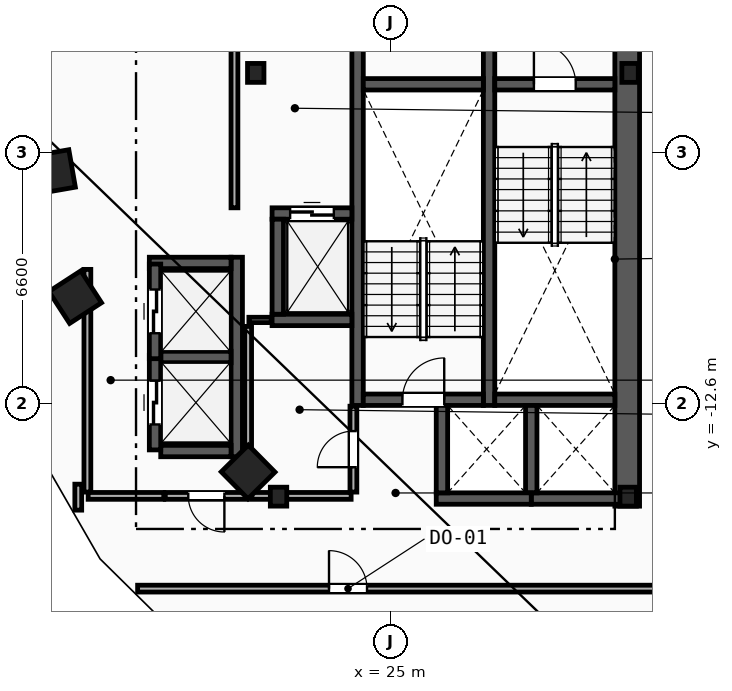
"""IFC4 building model, lengths in metres.
Left out: names, types, materials, properties, quantities, classifications, styles, units other than length and angle.
Written with IfcOpenShell. Run it as: python <this file> out.ifc"""

import sys

from ifc_helpers import new_model, si_unit, direction, frame, frame_2d, origin, origin_2d, place, context, subcontext, project, spatial, rectangle, i_section, extrude, element, fill, save


model = new_model("IFC4")
c1 = context("Model", 3, precision=1e-05, world=origin(), true_north=direction((0.0, 1.0)))
c2 = subcontext(c1, "Body", "Model", "MODEL_VIEW")
j1 = project(units=[si_unit("LENGTHUNIT", "METRE"), si_unit("PLANEANGLEUNIT", "RADIAN")], contexts=[c1])
p1 = place(None, origin())
s1 = spatial("IfcSite", under=j1, at=p1, CompositionType="ELEMENT")
p2 = place(p1, origin())
s2 = spatial("IfcBuilding", under=s1, at=p2, CompositionType="ELEMENT")
p3 = place(p2, frame((0.0, 0.0, 136.8)))
s3 = spatial("IfcBuildingStorey", under=s2, at=p3, CompositionType="ELEMENT", Elevation=136.8)
for number, where, z_axis, x_axis in (
    (1, (31.3, -3.9, 0.0), (0.0, 0.0, 1.0), (1.0, 0.0, 0.0)),
    (2, (21.45, -3.9, 0.0), (0.0, 0.0, 1.0), (1.0, 0.0, 0.0)),
    (3, (22.05, -15.05, 0.0), (0.0, 0.0, 1.0), (1.0, 0.0, 0.0)),
    (4, (31.25, -15.05, 0.0), (0.0, 0.0, 1.0), (1.0, 0.0, 0.0)),
):
    element("IfcColumn", number, at=place(p3, frame(where, z_axis=z_axis, x_axis=x_axis)), inside=s3, PredefinedType="COLUMN", context=c2, shape_type="SweptSolid", body=[
        extrude(i_section(OverallWidth=0.432, OverallDepth=0.498, WebThickness=0.056, FlangeThickness=0.089, FilletRadius=0.018, at=origin_2d()), origin(), (0.0, 0.0, 1.0), 3.6),
    ])
for number, where, z_axis, x_axis in (
    (5, (15.55, -3.2, 0.0), (0.0, 0.0, 1.0), (-0.315, -0.949, 0.0)),
    (6, (16.125, -6.5, 0.0), (0.0, 0.0, 1.0), (0.172, -0.985, 0.0)),
    (7, (16.7, -9.8, 0.0), (0.0, 0.0, 1.0), (0.544, -0.839, 0.0)),
    (8, (21.25, -14.4, 0.0), (0.0, 0.0, 1.0), (0.703, -0.711, 0.0)),
):
    element("IfcColumn", number, at=place(p3, frame(where, z_axis=z_axis, x_axis=x_axis)), inside=s3, PredefinedType="COLUMN", context=c2, shape_type="SweptSolid", body=[
        extrude(rectangle(XDim=1.0, YDim=1.0, at=origin_2d()), origin(), (0.0, 0.0, 1.0), 3.6),
    ])
p4 = place(p3, frame((31.225, -15.3, 0.0), z_axis=(0.0, 0.0, 1.0), x_axis=(0.0, 1.0, 0.0)))
e9 = element("IfcWall", 9, at=p4, inside=s3, PredefinedType="SHEAR", context=c2, shape_type="SweptSolid", body=[
    extrude(rectangle(XDim=13.33, YDim=0.65, at=frame_2d((6.665, 0.0))), origin(), (0.0, 0.0, 1.0), 3.36),
])
for number, where, z_axis, x_axis in (
    (10, (27.59, -12.65, 0.0), (0.0, 0.0, 1.0), (0.0, 1.0, 0.0)),
    (11, (24.13, -12.65, 0.0), (0.0, 0.0, 1.0), (0.0, 1.0, 0.0)),
):
    element("IfcWall", number, at=place(p3, frame(where, z_axis=z_axis, x_axis=x_axis)), inside=s3, PredefinedType="SHEAR", context=c2, shape_type="SweptSolid", body=[
        extrude(rectangle(XDim=10.68, YDim=0.3, at=frame_2d((5.34, 0.0))), origin(), (0.0, 0.0, 1.0), 3.36),
    ])
p5 = place(p3, frame((27.74, -4.2, 0.0), z_axis=(0.0, 0.0, 1.0), x_axis=(1.0, 0.0, 0.0)))
e12 = element("IfcWall", 12, at=p5, inside=s3, PredefinedType="SHEAR", context=c2, shape_type="SweptSolid", body=[
    extrude(rectangle(XDim=3.16, YDim=0.3, at=frame_2d((1.58, 0.0))), origin(), (0.0, 0.0, 1.0), 3.36),
])
p6 = place(p5, frame((1.03, 0.0, 0.0)))
e13 = element("IfcOpeningElement", 13, at=p6, cuts=e12, PredefinedType="OPENING", context=c2, shape_type="SweptSolid", body=[
    extrude(rectangle(XDim=1.1, YDim=2.15, at=frame_2d((0.55, 1.075))), frame((0.0, 0.16, 0.0), z_axis=(0.0, -1.0, 0.0), x_axis=(1.0, 0.0, 0.0)), (0.0, 0.0, 1.0), 0.32),
])
p7 = place(p3, frame((27.74, -12.5, 0.0), z_axis=(0.0, 0.0, 1.0), x_axis=(1.0, 0.0, 0.0)))
e14 = element("IfcWall", 14, at=p7, inside=s3, PredefinedType="SHEAR", context=c2, shape_type="SweptSolid", body=[
    extrude(rectangle(XDim=3.16, YDim=0.3, at=frame_2d((1.58, 0.0))), origin(), (0.0, 0.0, 1.0), 3.36),
])
p8 = place(p3, frame((24.28, -12.5, 0.0), z_axis=(0.0, 0.0, 1.0), x_axis=(1.0, 0.0, 0.0)))
e15 = element("IfcWall", 15, at=p8, inside=s3, PredefinedType="SHEAR", context=c2, shape_type="SweptSolid", body=[
    extrude(rectangle(XDim=3.16, YDim=0.3, at=frame_2d((1.58, 0.0))), origin(), (0.0, 0.0, 1.0), 3.36),
])
p9 = place(p8, frame((1.03, 0.0, 0.0)))
e16 = element("IfcOpeningElement", 16, at=p9, cuts=e15, PredefinedType="OPENING", context=c2, shape_type="SweptSolid", body=[
    extrude(rectangle(XDim=1.1, YDim=2.15, at=frame_2d((0.55, 1.075))), frame((0.0, 0.16, 0.0), z_axis=(0.0, -1.0, 0.0), x_axis=(1.0, 0.0, 0.0)), (0.0, 0.0, 1.0), 0.32),
])
p10 = place(p3, frame((24.28, -4.2, 0.0), z_axis=(0.0, 0.0, 1.0), x_axis=(1.0, 0.0, 0.0)))
e17 = element("IfcWall", 17, at=p10, inside=s3, PredefinedType="SHEAR", context=c2, shape_type="SweptSolid", body=[
    extrude(rectangle(XDim=3.16, YDim=0.3, at=frame_2d((1.58, 0.0))), origin(), (0.0, 0.0, 1.0), 3.36),
])
p11 = place(p3, frame((20.89, -7.45, 0.0), z_axis=(0.0, 0.0, 1.0), x_axis=(0.0, 1.0, 0.0)))
e18 = element("IfcWall", 18, at=p11, inside=s3, PredefinedType="PARTITIONING", context=c2, shape_type="SweptSolid", body=[
    extrude(rectangle(XDim=5.3, YDim=0.18, at=frame_2d((2.65, 0.0))), origin(), (0.0, 0.0, 1.0), 3.36),
])
p12 = place(p3, frame((21.88, -7.6, 0.0), z_axis=(0.0, 0.0, 1.0), x_axis=(1.0, 0.0, 0.0)))
e19 = element("IfcWall", 19, at=p12, inside=s3, PredefinedType="SHEAR", context=c2, shape_type="SweptSolid", body=[
    extrude(rectangle(XDim=2.1, YDim=0.3, at=frame_2d((1.05, 0.0))), origin(), (0.0, 0.0, 1.0), 3.36),
])
p13 = place(p12, frame((0.475, 0.0, 0.0)))
e20 = element("IfcOpeningElement", 20, at=p13, cuts=e19, PredefinedType="OPENING", context=c2, shape_type="SweptSolid", body=[
    extrude(rectangle(XDim=1.15, YDim=2.2, at=frame_2d((0.575, 1.1))), frame((0.0, 0.16, 0.0), z_axis=(0.0, -1.0, 0.0), x_axis=(1.0, 0.0, 0.0)), (0.0, 0.0, 1.0), 0.32),
])
p14 = place(p3, frame((21.88, -10.4, 0.0), z_axis=(0.0, 0.0, 1.0), x_axis=(1.0, 0.0, 0.0)))
e21 = element("IfcWall", 21, at=p14, inside=s3, PredefinedType="SHEAR", context=c2, shape_type="SweptSolid", body=[
    extrude(rectangle(XDim=2.1, YDim=0.3, at=frame_2d((1.05, 0.0))), origin(), (0.0, 0.0, 1.0), 3.36),
])
for number, where, z_axis, x_axis in (
    (22, (22.03, -10.25, 0.0), (0.0, 0.0, 1.0), (0.0, 1.0, 0.0)),
    (23, (28.7, -15.1, 0.0), (0.0, 0.0, 1.0), (1.0, 0.0, 0.0)),
):
    element("IfcWall", number, at=place(p3, frame(where, z_axis=z_axis, x_axis=x_axis)), inside=s3, PredefinedType="SHEAR", context=c2, shape_type="SweptSolid", body=[
        extrude(rectangle(XDim=2.5, YDim=0.3, at=frame_2d((1.25, 0.0))), origin(), (0.0, 0.0, 1.0), 3.36),
    ])
p15 = place(p3, frame((28.7, -14.95, 0.0), z_axis=(0.0, 0.0, 1.0), x_axis=(0.0, 1.0, 0.0)))
e24 = element("IfcWall", 24, at=p15, inside=s3, PredefinedType="SHEAR", context=c2, shape_type="SweptSolid", body=[
    extrude(rectangle(XDim=2.3, YDim=0.3, at=frame_2d((1.15, 0.0))), origin(), (0.0, 0.0, 1.0), 3.36),
])
p16 = place(p3, frame((26.2, -15.1, 0.0), z_axis=(0.0, 0.0, 1.0), x_axis=(1.0, 0.0, 0.0)))
e25 = element("IfcWall", 25, at=p16, inside=s3, PredefinedType="SHEAR", context=c2, shape_type="SweptSolid", body=[
    extrude(rectangle(XDim=2.5, YDim=0.3, at=frame_2d((1.25, 0.0))), origin(), (0.0, 0.0, 1.0), 3.36),
])
p17 = place(p3, frame((26.35, -14.95, 0.0), z_axis=(0.0, 0.0, 1.0), x_axis=(0.0, 1.0, 0.0)))
e26 = element("IfcWall", 26, at=p17, inside=s3, PredefinedType="SHEAR", context=c2, shape_type="SweptSolid", body=[
    extrude(rectangle(XDim=2.3, YDim=0.3, at=frame_2d((1.15, 0.0))), origin(), (0.0, 0.0, 1.0), 3.36),
])
p18 = place(p3, frame((20.95, -14.0, 0.0), z_axis=(0.0, 0.0, 1.0), x_axis=(0.0, 1.0, 0.0)))
e27 = element("IfcWall", 27, at=p18, inside=s3, PredefinedType="SHEAR", context=c2, shape_type="SweptSolid", body=[
    extrude(rectangle(XDim=5.25, YDim=0.3, at=frame_2d((2.625, 0.0))), origin(), (0.0, 0.0, 1.0), 3.36),
])
p19 = place(p3, frame((18.95, -13.85, 0.0), z_axis=(0.0, 0.0, 1.0), x_axis=(1.0, 0.0, 0.0)))
e28 = element("IfcWall", 28, at=p19, inside=s3, PredefinedType="SHEAR", context=c2, shape_type="SweptSolid", body=[
    extrude(rectangle(XDim=1.85, YDim=0.3, at=frame_2d((0.925, 0.0))), origin(), (0.0, 0.0, 1.0), 3.36),
])
p20 = place(p3, frame((18.65, -8.9, 0.0), z_axis=(0.0, 0.0, 1.0), x_axis=(1.0, 0.0, 0.0)))
e29 = element("IfcWall", 29, at=p20, inside=s3, PredefinedType="SHEAR", context=c2, shape_type="SweptSolid", body=[
    extrude(rectangle(XDim=2.15, YDim=0.3, at=frame_2d((1.075, 0.0))), origin(), (0.0, 0.0, 1.0), 3.36),
])
p21 = place(p3, frame((18.95, -11.375, 0.0), z_axis=(0.0, 0.0, 1.0), x_axis=(1.0, 0.0, 0.0)))
e30 = element("IfcWall", 30, at=p21, inside=s3, PredefinedType="SHEAR", context=c2, shape_type="SweptSolid", body=[
    extrude(rectangle(XDim=1.85, YDim=0.3, at=frame_2d((0.925, 0.0))), origin(), (0.0, 0.0, 1.0), 3.36),
])
p22 = place(p3, frame((18.8, -13.82, 0.0), z_axis=(0.0, 0.0, 1.0), x_axis=(0.0, 1.0, 0.0)))
e31 = element("IfcWall", 31, at=p22, inside=s3, PredefinedType="SHEAR", context=c2, shape_type="SweptSolid", body=[
    extrude(rectangle(XDim=2.49, YDim=0.3, at=frame_2d((1.245, 0.0))), origin(), (0.0, 0.0, 1.0), 3.36),
])
p23 = place(p22, frame((0.67, 0.0, 0.0)))
e32 = element("IfcOpeningElement", 32, at=p23, cuts=e31, PredefinedType="OPENING", context=c2, shape_type="SweptSolid", body=[
    extrude(rectangle(XDim=1.15, YDim=2.2, at=frame_2d((0.575, 1.1))), frame((0.0, 0.16, 0.0), z_axis=(0.0, -1.0, 0.0), x_axis=(1.0, 0.0, 0.0)), (0.0, 0.0, 1.0), 0.32),
])
p24 = place(p3, frame((18.8, -11.42, 0.0), z_axis=(0.0, 0.0, 1.0), x_axis=(0.0, 1.0, 0.0)))
e33 = element("IfcWall", 33, at=p24, inside=s3, PredefinedType="SHEAR", context=c2, shape_type="SweptSolid", body=[
    extrude(rectangle(XDim=2.49, YDim=0.3, at=frame_2d((1.245, 0.0))), origin(), (0.0, 0.0, 1.0), 3.36),
])
p25 = place(p24, frame((0.67, 0.0, 0.0)))
e34 = element("IfcOpeningElement", 34, at=p25, cuts=e33, PredefinedType="OPENING", context=c2, shape_type="SweptSolid", body=[
    extrude(rectangle(XDim=1.15, YDim=2.2, at=frame_2d((0.575, 1.1))), frame((0.0, 0.16, 0.0), z_axis=(0.0, -1.0, 0.0), x_axis=(1.0, 0.0, 0.0)), (0.0, 0.0, 1.0), 0.32),
])
p26 = place(p3, frame((17.02, -14.93, 0.0), z_axis=(0.0, 0.0, 1.0), x_axis=(0.0, 1.0, 0.0)))
e35 = element("IfcWall", 35, at=p26, inside=s3, PredefinedType="PARTITIONING", context=c2, shape_type="SweptSolid", body=[
    extrude(rectangle(XDim=5.86, YDim=0.18, at=frame_2d((2.93, 0.0))), origin(), (0.0, 0.0, 1.0), 3.36),
])
p27 = place(p3, frame((17.04, -15.03, 0.0), z_axis=(0.0, 0.0, 1.0), x_axis=(1.0, 0.0, 0.0)))
e36 = element("IfcWall", 36, at=p27, inside=s3, PredefinedType="PARTITIONING", context=c2, shape_type="SweptSolid", body=[
    extrude(rectangle(XDim=1.99, YDim=0.18, at=frame_2d((0.995, 0.0))), origin(), (0.0, 0.0, 1.0), 3.36),
])
p28 = place(p3, frame((21.23, -15.03, 0.0), z_axis=(0.0, 0.0, 1.0), x_axis=(-1.0, 0.0, 0.0)))
e37 = element("IfcWall", 37, at=p28, inside=s3, PredefinedType="PARTITIONING", context=c2, shape_type="SweptSolid", body=[
    extrude(rectangle(XDim=2.16, YDim=0.18, at=frame_2d((1.08, 0.0))), origin(), (0.0, 0.0, 1.0), 3.36),
])
p29 = place(p28, frame((0.605, 0.0, 0.0)))
e38 = element("IfcOpeningElement", 38, at=p29, cuts=e37, PredefinedType="OPENING", context=c2, shape_type="SweptSolid", body=[
    extrude(rectangle(XDim=0.95, YDim=2.1, at=frame_2d((0.475, 1.05))), frame((0.0, 0.1, 0.0), z_axis=(0.0, -1.0, 0.0), x_axis=(1.0, 0.0, 0.0)), (0.0, 0.0, 1.0), 0.2),
])
p30 = place(p3, frame((21.27, -10.4, 0.0), z_axis=(0.0, 0.0, 1.0), x_axis=(1.0, 0.0, 0.0)))
e39 = element("IfcWall", 39, at=p30, inside=s3, PredefinedType="PARTITIONING", context=c2, shape_type="SweptSolid", body=[
    extrude(rectangle(XDim=0.59, YDim=0.14, at=frame_2d((0.295, 0.0))), origin(), (0.0, 0.0, 1.0), 3.36),
])
p31 = place(p3, frame((21.25, -14.93, 0.0), z_axis=(0.0, 0.0, 1.0), x_axis=(0.0, 1.0, 0.0)))
e40 = element("IfcWall", 40, at=p31, inside=s3, PredefinedType="PARTITIONING", context=c2, shape_type="SweptSolid", body=[
    extrude(rectangle(XDim=4.36, YDim=0.18, at=frame_2d((2.18, 0.0))), origin(), (0.0, 0.0, 1.0), 3.36),
])
p32 = place(p3, frame((21.35, -15.03, 0.0), z_axis=(0.0, 0.0, 1.0), x_axis=(1.0, 0.0, 0.0)))
e41 = element("IfcWall", 41, at=p32, inside=s3, PredefinedType="PARTITIONING", context=c2, shape_type="SweptSolid", body=[
    extrude(rectangle(XDim=2.61, YDim=0.18, at=frame_2d((1.305, 0.0))), origin(), (0.0, 0.0, 1.0), 2.433),
])
p33 = place(p3, frame((24.02, -14.93, 0.0), z_axis=(0.0, 0.0, 1.0), x_axis=(0.0, 1.0, 0.0)))
e42 = element("IfcWall", 42, at=p33, inside=s3, PredefinedType="PARTITIONING", context=c2, shape_type="SweptSolid", body=[
    extrude(rectangle(XDim=2.26, YDim=0.18, at=frame_2d((1.13, 0.0))), origin(), (0.0, 0.0, 1.0), 3.36),
])
p34 = place(p33, frame((0.655, 0.0, 0.0)))
e43 = element("IfcOpeningElement", 43, at=p34, cuts=e42, PredefinedType="OPENING", context=c2, shape_type="SweptSolid", body=[
    extrude(rectangle(XDim=0.95, YDim=2.1, at=frame_2d((0.475, 1.05))), frame((0.0, 0.1, 0.0), z_axis=(0.0, -1.0, 0.0), x_axis=(1.0, 0.0, 0.0)), (0.0, 0.0, 1.0), 0.2),
])
p35 = place(p3, frame((18.342, -17.47, 0.0), z_axis=(0.0, 0.0, 1.0), x_axis=(1.0, 0.0, 0.0)))
e44 = element("IfcWall", 44, at=p35, inside=s3, PredefinedType="PARTITIONING", context=c2, shape_type="SweptSolid", body=[
    extrude(rectangle(XDim=15.287, YDim=0.18, at=frame_2d((7.643, 0.0))), origin(), (0.0, 0.0, 1.0), 3.36),
])
p36 = place(p35, frame((5.036, 0.0, 0.0)))
e45 = element("IfcOpeningElement", 45, at=p36, cuts=e44, PredefinedType="OPENING", context=c2, shape_type="SweptSolid", body=[
    extrude(rectangle(XDim=1.0, YDim=2.15, at=frame_2d((0.5, 1.075))), frame((0.0, 0.1, 0.0), z_axis=(0.0, -1.0, 0.0), x_axis=(1.0, 0.0, 0.0)), (0.0, 0.0, 1.0), 0.2),
])
p37 = place(p3, frame((16.78, -14.721, 0.0), z_axis=(0.0, 0.0, 1.0), x_axis=(0.0, -1.0, 0.0)))
e46 = element("IfcWall", 46, at=p37, inside=s3, PredefinedType="PARTITIONING", context=c2, shape_type="SweptSolid", body=[
    extrude(rectangle(XDim=0.684, YDim=0.18, at=frame_2d((0.342, 0.0))), origin(), (0.0, 0.0, 1.0), 3.36),
])
p38 = place(p6, origin())
e47 = element("IfcDoor", 47, at=p38, inside=s3, OperationType="SINGLE_SWING_LEFT", PredefinedType="DOOR", context=c2, shape_type="SweptSolid", body=[
    extrude(rectangle(XDim=1.1, YDim=2.15, at=frame_2d((0.55, 1.075))), frame((0.0, 0.025, 0.0), z_axis=(0.0, -1.0, 0.0), x_axis=(1.0, 0.0, 0.0)), (0.0, 0.0, 1.0), 0.05),
])
fill(e13, e47)
p39 = place(p9, origin())
e48 = element("IfcDoor", 48, at=p39, inside=s3, OperationType="SINGLE_SWING_RIGHT", PredefinedType="DOOR", context=c2, shape_type="SweptSolid", body=[
    extrude(rectangle(XDim=1.1, YDim=2.15, at=frame_2d((0.55, 1.075))), frame((0.0, 0.025, 0.0), z_axis=(0.0, -1.0, 0.0), x_axis=(1.0, 0.0, 0.0)), (0.0, 0.0, 1.0), 0.05),
])
fill(e16, e48)
p40 = place(p13, origin())
e49 = element("IfcDoor", 49, at=p40, inside=s3, OperationType="SLIDING_TO_LEFT", PredefinedType="TRAPDOOR", context=c2, shape_type="SweptSolid", body=[
    extrude(rectangle(XDim=1.15, YDim=2.2, at=frame_2d((0.575, 1.1))), frame((0.0, 0.025, 0.0), z_axis=(0.0, -1.0, 0.0), x_axis=(1.0, 0.0, 0.0)), (0.0, 0.0, 1.0), 0.05),
])
fill(e20, e49)
p41 = place(p23, origin())
e50 = element("IfcDoor", 50, at=p41, inside=s3, OperationType="SLIDING_TO_LEFT", PredefinedType="TRAPDOOR", context=c2, shape_type="SweptSolid", body=[
    extrude(rectangle(XDim=1.15, YDim=2.2, at=frame_2d((0.575, 1.1))), frame((0.0, 0.025, 0.0), z_axis=(0.0, -1.0, 0.0), x_axis=(1.0, 0.0, 0.0)), (0.0, 0.0, 1.0), 0.05),
])
fill(e32, e50)
p42 = place(p25, origin())
e51 = element("IfcDoor", 51, at=p42, inside=s3, OperationType="SLIDING_TO_LEFT", PredefinedType="TRAPDOOR", context=c2, shape_type="SweptSolid", body=[
    extrude(rectangle(XDim=1.15, YDim=2.2, at=frame_2d((0.575, 1.1))), frame((0.0, 0.025, 0.0), z_axis=(0.0, -1.0, 0.0), x_axis=(1.0, 0.0, 0.0)), (0.0, 0.0, 1.0), 0.05),
])
fill(e34, e51)
p43 = place(p36, origin())
e52 = element("IfcDoor", 52, at=p43, inside=s3, OperationType="SINGLE_SWING_LEFT", PredefinedType="DOOR", context=c2, shape_type="SweptSolid", body=[
    extrude(rectangle(XDim=1.0, YDim=2.15, at=frame_2d((0.5, 1.075))), frame((0.0, 0.025, 0.0), z_axis=(0.0, -1.0, 0.0), x_axis=(1.0, 0.0, 0.0)), (0.0, 0.0, 1.0), 0.05),
])
fill(e45, e52)
p44 = place(p34, origin())
e53 = element("IfcDoor", 53, at=p44, inside=s3, OperationType="SINGLE_SWING_LEFT", PredefinedType="DOOR", context=c2, shape_type="SweptSolid", body=[
    extrude(rectangle(XDim=0.95, YDim=2.1, at=frame_2d((0.475, 1.05))), frame((0.0, 0.025, 0.0), z_axis=(0.0, -1.0, 0.0), x_axis=(1.0, 0.0, 0.0)), (0.0, 0.0, 1.0), 0.05),
])
fill(e43, e53)
p45 = place(p29, origin())
e54 = element("IfcDoor", 54, at=p45, inside=s3, OperationType="SINGLE_SWING_LEFT", PredefinedType="DOOR", context=c2, shape_type="SweptSolid", body=[
    extrude(rectangle(XDim=0.95, YDim=2.1, at=frame_2d((0.475, 1.05))), frame((0.0, 0.025, 0.0), z_axis=(0.0, -1.0, 0.0), x_axis=(1.0, 0.0, 0.0)), (0.0, 0.0, 1.0), 0.05),
])
fill(e38, e54)
save(model, sys.argv[1])
